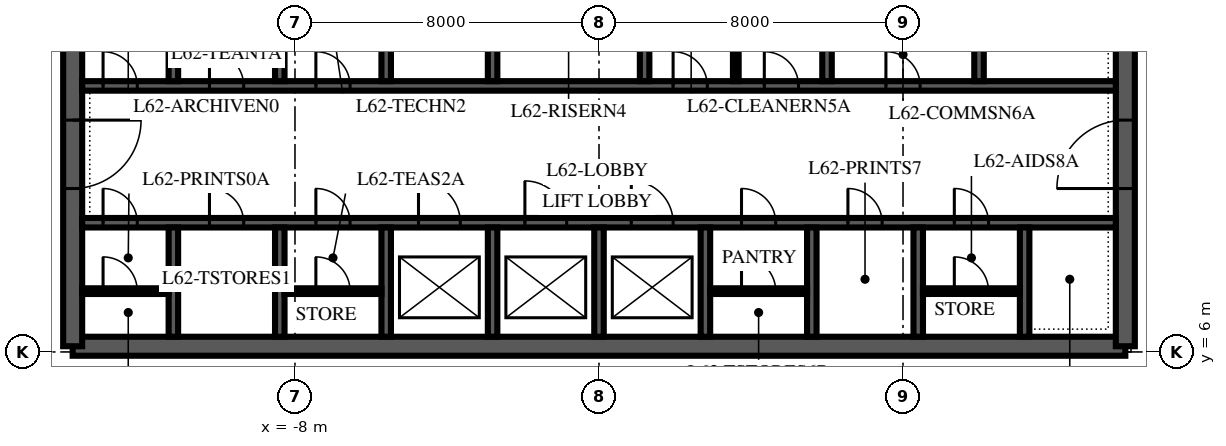
"""IFC4 building model, lengths in metres.
Left out: names, types, materials, properties, quantities, classifications, styles, units other than length and angle.
Written with IfcOpenShell. Run it as: python <this file> out.ifc"""

import sys

from ifc_helpers import new_model, si_unit, direction, frame, frame_2d, origin, place, context, subcontext, project, spatial, polyline, rectangle, outline, extrude, element, fill, save


model = new_model("IFC4")
c1 = context("Model", 3, precision=1e-05, world=origin(), true_north=direction((0.0, 1.0)))
c2 = subcontext(c1, "Body", "Model", "MODEL_VIEW")
j1 = project(units=[si_unit("LENGTHUNIT", "METRE"), si_unit("PLANEANGLEUNIT", "RADIAN")], contexts=[c1])
p1 = place(None, origin())
s1 = spatial("IfcSite", under=j1, at=p1, CompositionType="ELEMENT")
p2 = place(p1, origin())
s2 = spatial("IfcBuilding", under=s1, at=p2, CompositionType="ELEMENT")
p3 = place(p2, frame((0.0, 0.0, 268.0)))
s3 = spatial("IfcBuildingStorey", under=s2, at=p3, CompositionType="ELEMENT", Elevation=268.0)
p4 = place(p3, frame((-13.85, 6.15, 0.0), z_axis=(0.0, 0.0, 1.0), x_axis=(1.0, 0.0, 0.0)))
e1 = element("IfcWall", 1, at=p4, inside=s3, PredefinedType="SHEAR", context=c2, shape_type="SweptSolid", body=[
    extrude(rectangle(XDim=27.7, YDim=0.5, at=frame_2d((13.85, 0.0))), origin(), (0.0, 0.0, 1.0), 4.0),
])
p5 = place(p3, frame((13.85, 6.15, 0.0), z_axis=(0.0, 0.0, 1.0), x_axis=(0.0, 1.0, 0.0)))
e2 = element("IfcWall", 2, at=p5, inside=s3, PredefinedType="SHEAR", context=c2, shape_type="SweptSolid", body=[
    extrude(outline(polyline([(0.0, -0.25), (17.7, -0.25), (17.7, 0.0), (17.45, 0.0), (17.45, 0.25), (0.25, 0.25), (0.25, 0.0), (0.0, 0.0), (0.0, -0.25)])), origin(), (0.0, 0.0, 1.0), 4.0),
])
p6 = place(p5, frame((4.15, 0.0, 0.0)))
e3 = element("IfcOpeningElement", 3, at=p6, cuts=e2, PredefinedType="OPENING", context=c2, shape_type="SweptSolid", body=[
    extrude(rectangle(XDim=1.8, YDim=2.4, at=frame_2d((0.9, 1.2))), frame((0.0, 0.265, 0.0), z_axis=(0.0, -1.0, 0.0), x_axis=(1.0, 0.0, 0.0)), (0.0, 0.0, 1.0), 0.53),
])
p7 = place(p3, frame((-13.85, 23.85, 0.0), z_axis=(0.0, 0.0, 1.0), x_axis=(0.0, -1.0, 0.0)))
e4 = element("IfcWall", 4, at=p7, inside=s3, PredefinedType="SHEAR", context=c2, shape_type="SweptSolid", body=[
    extrude(outline(polyline([(0.0, -0.25), (17.7, -0.25), (17.7, 0.0), (17.45, 0.0), (17.45, 0.25), (0.25, 0.25), (0.25, 0.0), (0.0, 0.0), (0.0, -0.25)])), origin(), (0.0, 0.0, 1.0), 4.0),
])
p8 = place(p7, frame((11.75, 0.0, 0.0)))
e5 = element("IfcOpeningElement", 5, at=p8, cuts=e4, PredefinedType="OPENING", context=c2, shape_type="SweptSolid", body=[
    extrude(rectangle(XDim=1.8, YDim=2.4, at=frame_2d((0.9, 1.2))), frame((0.0, 0.265, 0.0), z_axis=(0.0, -1.0, 0.0), x_axis=(1.0, 0.0, 0.0)), (0.0, 0.0, 1.0), 0.53),
])
p9 = place(p3, frame((-13.6, 9.4, 0.0), z_axis=(0.0, 0.0, 1.0), x_axis=(1.0, 0.0, 0.0)))
e6 = element("IfcWall", 6, at=p9, inside=s3, PredefinedType="SHEAR", context=c2, shape_type="SweptSolid", body=[
    extrude(rectangle(XDim=27.2, YDim=0.25, at=frame_2d((13.6, 0.0))), origin(), (0.0, 0.0, 1.0), 4.0),
])
p10 = place(p9, frame((8.85, 0.0, 0.0)))
e7 = element("IfcOpeningElement", 7, at=p10, cuts=e6, PredefinedType="OPENING", context=c2, shape_type="SweptSolid", body=[
    extrude(rectangle(XDim=1.1, YDim=2.1, at=frame_2d((0.55, 1.05))), frame((0.0, 0.14, 0.0), z_axis=(0.0, -1.0, 0.0), x_axis=(1.0, 0.0, 0.0)), (0.0, 0.0, 1.0), 0.28),
])
p11 = place(p9, frame((11.65, 0.0, 0.0)))
e8 = element("IfcOpeningElement", 8, at=p11, cuts=e6, PredefinedType="OPENING", context=c2, shape_type="SweptSolid", body=[
    extrude(rectangle(XDim=1.1, YDim=2.1, at=frame_2d((0.55, 1.05))), frame((0.0, 0.14, 0.0), z_axis=(0.0, -1.0, 0.0), x_axis=(1.0, 0.0, 0.0)), (0.0, 0.0, 1.0), 0.28),
])
p12 = place(p9, frame((14.45, 0.0, 0.0)))
e9 = element("IfcOpeningElement", 9, at=p12, cuts=e6, PredefinedType="OPENING", context=c2, shape_type="SweptSolid", body=[
    extrude(rectangle(XDim=1.1, YDim=2.1, at=frame_2d((0.55, 1.05))), frame((0.0, 0.14, 0.0), z_axis=(0.0, -1.0, 0.0), x_axis=(1.0, 0.0, 0.0)), (0.0, 0.0, 1.0), 0.28),
])
p13 = place(p9, frame((0.55, 0.0, 0.0)))
e10 = element("IfcOpeningElement", 10, at=p13, cuts=e6, PredefinedType="OPENING", context=c2, shape_type="SweptSolid", body=[
    extrude(rectangle(XDim=0.9, YDim=2.1, at=frame_2d((0.45, 1.05))), frame((0.0, 0.14, 0.0), z_axis=(0.0, -1.0, 0.0), x_axis=(1.0, 0.0, 0.0)), (0.0, 0.0, 1.0), 0.28),
])
p14 = place(p9, frame((3.35, 0.0, 0.0)))
e11 = element("IfcOpeningElement", 11, at=p14, cuts=e6, PredefinedType="OPENING", context=c2, shape_type="SweptSolid", body=[
    extrude(rectangle(XDim=0.9, YDim=2.1, at=frame_2d((0.45, 1.05))), frame((0.0, 0.14, 0.0), z_axis=(0.0, -1.0, 0.0), x_axis=(1.0, 0.0, 0.0)), (0.0, 0.0, 1.0), 0.28),
])
p15 = place(p9, frame((6.15, 0.0, 0.0)))
e12 = element("IfcOpeningElement", 12, at=p15, cuts=e6, PredefinedType="OPENING", context=c2, shape_type="SweptSolid", body=[
    extrude(rectangle(XDim=0.9, YDim=2.1, at=frame_2d((0.45, 1.05))), frame((0.0, 0.14, 0.0), z_axis=(0.0, -1.0, 0.0), x_axis=(1.0, 0.0, 0.0)), (0.0, 0.0, 1.0), 0.28),
])
p16 = place(p9, frame((17.35, 0.0, 0.0)))
e13 = element("IfcOpeningElement", 13, at=p16, cuts=e6, PredefinedType="OPENING", context=c2, shape_type="SweptSolid", body=[
    extrude(rectangle(XDim=0.9, YDim=2.1, at=frame_2d((0.45, 1.05))), frame((0.0, 0.14, 0.0), z_axis=(0.0, -1.0, 0.0), x_axis=(1.0, 0.0, 0.0)), (0.0, 0.0, 1.0), 0.28),
])
p17 = place(p9, frame((20.15, 0.0, 0.0)))
e14 = element("IfcOpeningElement", 14, at=p17, cuts=e6, PredefinedType="OPENING", context=c2, shape_type="SweptSolid", body=[
    extrude(rectangle(XDim=0.9, YDim=2.1, at=frame_2d((0.45, 1.05))), frame((0.0, 0.14, 0.0), z_axis=(0.0, -1.0, 0.0), x_axis=(1.0, 0.0, 0.0)), (0.0, 0.0, 1.0), 0.28),
])
p18 = place(p9, frame((22.95, 0.0, 0.0)))
e15 = element("IfcOpeningElement", 15, at=p18, cuts=e6, PredefinedType="OPENING", context=c2, shape_type="SweptSolid", body=[
    extrude(rectangle(XDim=0.9, YDim=2.1, at=frame_2d((0.45, 1.05))), frame((0.0, 0.14, 0.0), z_axis=(0.0, -1.0, 0.0), x_axis=(1.0, 0.0, 0.0)), (0.0, 0.0, 1.0), 0.28),
])
p19 = place(p3, frame((-13.6, 13.0, 0.0), z_axis=(0.0, 0.0, 1.0), x_axis=(1.0, 0.0, 0.0)))
e16 = element("IfcWall", 16, at=p19, inside=s3, PredefinedType="SHEAR", context=c2, shape_type="SweptSolid", body=[
    extrude(rectangle(XDim=27.2, YDim=0.25, at=frame_2d((13.6, 0.0))), origin(), (0.0, 0.0, 1.0), 4.0),
])
p20 = place(p19, frame((15.55, 0.0, 0.0)))
e17 = element("IfcOpeningElement", 17, at=p20, cuts=e16, PredefinedType="OPENING", context=c2, shape_type="SweptSolid", body=[
    extrude(rectangle(XDim=0.9, YDim=2.1, at=frame_2d((0.45, 1.05))), frame((0.0, 0.14, 0.0), z_axis=(0.0, -1.0, 0.0), x_axis=(1.0, 0.0, 0.0)), (0.0, 0.0, 1.0), 0.28),
])
p21 = place(p19, frame((17.95, 0.0, 0.0)))
e18 = element("IfcOpeningElement", 18, at=p21, cuts=e16, PredefinedType="OPENING", context=c2, shape_type="SweptSolid", body=[
    extrude(rectangle(XDim=0.9, YDim=2.1, at=frame_2d((0.45, 1.05))), frame((0.0, 0.14, 0.0), z_axis=(0.0, -1.0, 0.0), x_axis=(1.0, 0.0, 0.0)), (0.0, 0.0, 1.0), 0.28),
])
p22 = place(p19, frame((21.15, 0.0, 0.0)))
e19 = element("IfcOpeningElement", 19, at=p22, cuts=e16, PredefinedType="OPENING", context=c2, shape_type="SweptSolid", body=[
    extrude(rectangle(XDim=0.9, YDim=2.1, at=frame_2d((0.45, 1.05))), frame((0.0, 0.14, 0.0), z_axis=(0.0, -1.0, 0.0), x_axis=(1.0, 0.0, 0.0)), (0.0, 0.0, 1.0), 0.28),
])
p23 = place(p19, frame((0.55, 0.0, 0.0)))
e20 = element("IfcOpeningElement", 20, at=p23, cuts=e16, PredefinedType="OPENING", context=c2, shape_type="SweptSolid", body=[
    extrude(rectangle(XDim=0.9, YDim=2.1, at=frame_2d((0.45, 1.05))), frame((0.0, 0.14, 0.0), z_axis=(0.0, -1.0, 0.0), x_axis=(1.0, 0.0, 0.0)), (0.0, 0.0, 1.0), 0.28),
])
p24 = place(p19, frame((3.35, 0.0, 0.0)))
e21 = element("IfcOpeningElement", 21, at=p24, cuts=e16, PredefinedType="OPENING", context=c2, shape_type="SweptSolid", body=[
    extrude(rectangle(XDim=0.9, YDim=2.1, at=frame_2d((0.45, 1.05))), frame((0.0, 0.14, 0.0), z_axis=(0.0, -1.0, 0.0), x_axis=(1.0, 0.0, 0.0)), (0.0, 0.0, 1.0), 0.28),
])
p25 = place(p19, frame((6.15, 0.0, 0.0)))
e22 = element("IfcOpeningElement", 22, at=p25, cuts=e16, PredefinedType="OPENING", context=c2, shape_type="SweptSolid", body=[
    extrude(rectangle(XDim=0.9, YDim=2.1, at=frame_2d((0.45, 1.05))), frame((0.0, 0.14, 0.0), z_axis=(0.0, -1.0, 0.0), x_axis=(1.0, 0.0, 0.0)), (0.0, 0.0, 1.0), 0.28),
])
for number, where, z_axis, x_axis in (
    (23, (-11.2, 6.4, 0.0), (0.0, 0.0, 1.0), (0.0, 1.0, 0.0)),
    (24, (-8.4, 6.4, 0.0), (0.0, 0.0, 1.0), (0.0, 1.0, 0.0)),
    (25, (-5.6, 6.4, 0.0), (0.0, 0.0, 1.0), (0.0, 1.0, 0.0)),
    (26, (-2.8, 6.4, 0.0), (0.0, 0.0, 1.0), (0.0, 1.0, 0.0)),
    (27, (0.0, 6.4, 0.0), (0.0, 0.0, 1.0), (0.0, 1.0, 0.0)),
    (28, (2.8, 6.4, 0.0), (0.0, 0.0, 1.0), (0.0, 1.0, 0.0)),
    (29, (5.6, 6.4, 0.0), (0.0, 0.0, 1.0), (0.0, 1.0, 0.0)),
    (30, (8.4, 6.4, 0.0), (0.0, 0.0, 1.0), (0.0, 1.0, 0.0)),
    (31, (11.2, 6.4, 0.0), (0.0, 0.0, 1.0), (0.0, 1.0, 0.0)),
):
    element("IfcWall", number, at=place(p3, frame(where, z_axis=z_axis, x_axis=x_axis)), inside=s3, PredefinedType="SHEAR", context=c2, shape_type="SweptSolid", body=[
        extrude(rectangle(XDim=2.875, YDim=0.25, at=frame_2d((1.438, 0.0))), origin(), (0.0, 0.0, 1.0), 4.0),
    ])
for number, where, z_axis, x_axis in (
    (32, (-11.2, 13.125, 0.0), (0.0, 0.0, 1.0), (0.0, 1.0, 0.0)),
    (33, (-8.4, 13.125, 0.0), (0.0, 0.0, 1.0), (0.0, 1.0, 0.0)),
    (34, (-5.6, 13.125, 0.0), (0.0, 0.0, 1.0), (0.0, 1.0, 0.0)),
    (35, (-2.8, 13.125, 0.0), (0.0, 0.0, 1.0), (0.0, 1.0, 0.0)),
    (36, (1.2, 13.125, 0.0), (0.0, 0.0, 1.0), (0.0, 1.0, 0.0)),
    (37, (6.0, 13.125, 0.0), (0.0, 0.0, 1.0), (0.0, 1.0, 0.0)),
    (38, (10.0, 13.125, 0.0), (0.0, 0.0, 1.0), (0.0, 1.0, 0.0)),
):
    element("IfcWall", number, at=place(p3, frame(where, z_axis=z_axis, x_axis=x_axis)), inside=s3, PredefinedType="SHEAR", context=c2, shape_type="SweptSolid", body=[
        extrude(rectangle(XDim=2.75, YDim=0.25, at=frame_2d((1.375, 0.0))), origin(), (0.0, 0.0, 1.0), 4.0),
    ])
p26 = place(p3, frame((3.6, 13.125, 0.0), z_axis=(0.0, 0.0, 1.0), x_axis=(0.0, 1.0, 0.0)))
e39 = element("IfcWall", 39, at=p26, inside=s3, PredefinedType="PARTITIONING", context=c2, shape_type="SweptSolid", body=[
    extrude(rectangle(XDim=2.75, YDim=0.15, at=frame_2d((1.375, 0.0))), origin(), (0.0, 0.0, 1.0), 3.85),
])
p27 = place(p3, frame((-13.6, 7.6, 0.0), z_axis=(0.0, 0.0, 1.0), x_axis=(1.0, 0.0, 0.0)))
e40 = element("IfcWall", 40, at=p27, inside=s3, PredefinedType="PARTITIONING", context=c2, shape_type="SweptSolid", body=[
    extrude(rectangle(XDim=2.275, YDim=0.15, at=frame_2d((1.138, 0.0))), origin(), (0.0, 0.0, 1.0), 3.85),
])
p28 = place(p27, frame((0.55, 0.0, 0.0)))
e41 = element("IfcOpeningElement", 41, at=p28, cuts=e40, PredefinedType="OPENING", context=c2, shape_type="SweptSolid", body=[
    extrude(rectangle(XDim=0.9, YDim=2.1, at=frame_2d((0.45, 1.05))), frame((0.0, 0.09, 0.0), z_axis=(0.0, -1.0, 0.0), x_axis=(1.0, 0.0, 0.0)), (0.0, 0.0, 1.0), 0.18),
])
p29 = place(p3, frame((-8.275, 7.6, 0.0), z_axis=(0.0, 0.0, 1.0), x_axis=(1.0, 0.0, 0.0)))
e42 = element("IfcWall", 42, at=p29, inside=s3, PredefinedType="PARTITIONING", context=c2, shape_type="SweptSolid", body=[
    extrude(rectangle(XDim=2.55, YDim=0.15, at=frame_2d((1.275, 0.0))), origin(), (0.0, 0.0, 1.0), 3.85),
])
p30 = place(p29, frame((0.825, 0.0, 0.0)))
e43 = element("IfcOpeningElement", 43, at=p30, cuts=e42, PredefinedType="OPENING", context=c2, shape_type="SweptSolid", body=[
    extrude(rectangle(XDim=0.9, YDim=2.1, at=frame_2d((0.45, 1.05))), frame((0.0, 0.09, 0.0), z_axis=(0.0, -1.0, 0.0), x_axis=(1.0, 0.0, 0.0)), (0.0, 0.0, 1.0), 0.18),
])
p31 = place(p3, frame((2.925, 7.6, 0.0), z_axis=(0.0, 0.0, 1.0), x_axis=(1.0, 0.0, 0.0)))
e44 = element("IfcWall", 44, at=p31, inside=s3, PredefinedType="PARTITIONING", context=c2, shape_type="SweptSolid", body=[
    extrude(rectangle(XDim=2.55, YDim=0.15, at=frame_2d((1.275, 0.0))), origin(), (0.0, 0.0, 1.0), 3.85),
])
p32 = place(p31, frame((0.825, 0.0, 0.0)))
e45 = element("IfcOpeningElement", 45, at=p32, cuts=e44, PredefinedType="OPENING", context=c2, shape_type="SweptSolid", body=[
    extrude(rectangle(XDim=0.9, YDim=2.1, at=frame_2d((0.45, 1.05))), frame((0.0, 0.09, 0.0), z_axis=(0.0, -1.0, 0.0), x_axis=(1.0, 0.0, 0.0)), (0.0, 0.0, 1.0), 0.18),
])
p33 = place(p3, frame((8.525, 7.6, 0.0), z_axis=(0.0, 0.0, 1.0), x_axis=(1.0, 0.0, 0.0)))
e46 = element("IfcWall", 46, at=p33, inside=s3, PredefinedType="PARTITIONING", context=c2, shape_type="SweptSolid", body=[
    extrude(rectangle(XDim=2.55, YDim=0.15, at=frame_2d((1.275, 0.0))), origin(), (0.0, 0.0, 1.0), 3.85),
])
p34 = place(p33, frame((0.825, 0.0, 0.0)))
e47 = element("IfcOpeningElement", 47, at=p34, cuts=e46, PredefinedType="OPENING", context=c2, shape_type="SweptSolid", body=[
    extrude(rectangle(XDim=0.9, YDim=2.1, at=frame_2d((0.45, 1.05))), frame((0.0, 0.09, 0.0), z_axis=(0.0, -1.0, 0.0), x_axis=(1.0, 0.0, 0.0)), (0.0, 0.0, 1.0), 0.18),
])
p35 = place(p6, origin())
e48 = element("IfcDoor", 48, at=p35, inside=s3, OperationType="DOUBLE_DOOR_SINGLE_SWING", PredefinedType="DOOR", context=c2, shape_type="SweptSolid", body=[
    extrude(rectangle(XDim=1.8, YDim=2.4, at=frame_2d((0.9, 1.2))), frame((0.0, 0.25, 0.0), z_axis=(0.0, -1.0, 0.0), x_axis=(1.0, 0.0, 0.0)), (0.0, 0.0, 1.0), 0.5),
])
fill(e3, e48)
p36 = place(p8, origin())
e49 = element("IfcDoor", 49, at=p36, inside=s3, OperationType="DOUBLE_DOOR_SINGLE_SWING", PredefinedType="DOOR", context=c2, shape_type="SweptSolid", body=[
    extrude(rectangle(XDim=1.8, YDim=2.4, at=frame_2d((0.9, 1.2))), frame((0.0, 0.25, 0.0), z_axis=(0.0, -1.0, 0.0), x_axis=(1.0, 0.0, 0.0)), (0.0, 0.0, 1.0), 0.5),
])
fill(e5, e49)
p37 = place(p10, origin())
e50 = element("IfcDoor", 50, at=p37, inside=s3, OperationType="SLIDING_TO_LEFT", PredefinedType="DOOR", context=c2, shape_type="SweptSolid", body=[
    extrude(rectangle(XDim=1.1, YDim=2.1, at=frame_2d((0.55, 1.05))), frame((0.0, 0.125, 0.0), z_axis=(0.0, -1.0, 0.0), x_axis=(1.0, 0.0, 0.0)), (0.0, 0.0, 1.0), 0.25),
])
fill(e7, e50)
p38 = place(p11, origin())
e51 = element("IfcDoor", 51, at=p38, inside=s3, OperationType="SLIDING_TO_LEFT", PredefinedType="DOOR", context=c2, shape_type="SweptSolid", body=[
    extrude(rectangle(XDim=1.1, YDim=2.1, at=frame_2d((0.55, 1.05))), frame((0.0, 0.125, 0.0), z_axis=(0.0, -1.0, 0.0), x_axis=(1.0, 0.0, 0.0)), (0.0, 0.0, 1.0), 0.25),
])
fill(e8, e51)
p39 = place(p12, origin())
e52 = element("IfcDoor", 52, at=p39, inside=s3, OperationType="SLIDING_TO_LEFT", PredefinedType="DOOR", context=c2, shape_type="SweptSolid", body=[
    extrude(rectangle(XDim=1.1, YDim=2.1, at=frame_2d((0.55, 1.05))), frame((0.0, 0.125, 0.0), z_axis=(0.0, -1.0, 0.0), x_axis=(1.0, 0.0, 0.0)), (0.0, 0.0, 1.0), 0.25),
])
fill(e9, e52)
p40 = place(p20, origin())
e53 = element("IfcDoor", 53, at=p40, inside=s3, OperationType="SINGLE_SWING_LEFT", PredefinedType="DOOR", context=c2, shape_type="SweptSolid", body=[
    extrude(rectangle(XDim=0.9, YDim=2.1, at=frame_2d((0.45, 1.05))), frame((0.0, 0.125, 0.0), z_axis=(0.0, -1.0, 0.0), x_axis=(1.0, 0.0, 0.0)), (0.0, 0.0, 1.0), 0.25),
])
fill(e17, e53)
p41 = place(p21, origin())
e54 = element("IfcDoor", 54, at=p41, inside=s3, OperationType="SINGLE_SWING_LEFT", PredefinedType="DOOR", context=c2, shape_type="SweptSolid", body=[
    extrude(rectangle(XDim=0.9, YDim=2.1, at=frame_2d((0.45, 1.05))), frame((0.0, 0.125, 0.0), z_axis=(0.0, -1.0, 0.0), x_axis=(1.0, 0.0, 0.0)), (0.0, 0.0, 1.0), 0.25),
])
fill(e18, e54)
p42 = place(p22, origin())
e55 = element("IfcDoor", 55, at=p42, inside=s3, OperationType="SINGLE_SWING_LEFT", PredefinedType="DOOR", context=c2, shape_type="SweptSolid", body=[
    extrude(rectangle(XDim=0.9, YDim=2.1, at=frame_2d((0.45, 1.05))), frame((0.0, 0.125, 0.0), z_axis=(0.0, -1.0, 0.0), x_axis=(1.0, 0.0, 0.0)), (0.0, 0.0, 1.0), 0.25),
])
fill(e19, e55)
p43 = place(p23, origin())
e56 = element("IfcDoor", 56, at=p43, inside=s3, OperationType="SINGLE_SWING_LEFT", PredefinedType="DOOR", context=c2, shape_type="SweptSolid", body=[
    extrude(rectangle(XDim=0.9, YDim=2.1, at=frame_2d((0.45, 1.05))), frame((0.0, 0.125, 0.0), z_axis=(0.0, -1.0, 0.0), x_axis=(1.0, 0.0, 0.0)), (0.0, 0.0, 1.0), 0.25),
])
fill(e20, e56)
p44 = place(p24, origin())
e57 = element("IfcDoor", 57, at=p44, inside=s3, OperationType="SINGLE_SWING_LEFT", PredefinedType="DOOR", context=c2, shape_type="SweptSolid", body=[
    extrude(rectangle(XDim=0.9, YDim=2.1, at=frame_2d((0.45, 1.05))), frame((0.0, 0.125, 0.0), z_axis=(0.0, -1.0, 0.0), x_axis=(1.0, 0.0, 0.0)), (0.0, 0.0, 1.0), 0.25),
])
fill(e21, e57)
p45 = place(p25, origin())
e58 = element("IfcDoor", 58, at=p45, inside=s3, OperationType="SINGLE_SWING_LEFT", PredefinedType="DOOR", context=c2, shape_type="SweptSolid", body=[
    extrude(rectangle(XDim=0.9, YDim=2.1, at=frame_2d((0.45, 1.05))), frame((0.0, 0.125, 0.0), z_axis=(0.0, -1.0, 0.0), x_axis=(1.0, 0.0, 0.0)), (0.0, 0.0, 1.0), 0.25),
])
fill(e22, e58)
p46 = place(p13, origin())
e59 = element("IfcDoor", 59, at=p46, inside=s3, OperationType="SINGLE_SWING_LEFT", PredefinedType="DOOR", context=c2, shape_type="SweptSolid", body=[
    extrude(rectangle(XDim=0.9, YDim=2.1, at=frame_2d((0.45, 1.05))), frame((0.0, 0.125, 0.0), z_axis=(0.0, -1.0, 0.0), x_axis=(1.0, 0.0, 0.0)), (0.0, 0.0, 1.0), 0.25),
])
fill(e10, e59)
p47 = place(p28, origin())
e60 = element("IfcDoor", 60, at=p47, inside=s3, OperationType="SINGLE_SWING_LEFT", PredefinedType="DOOR", context=c2, shape_type="SweptSolid", body=[
    extrude(rectangle(XDim=0.9, YDim=2.1, at=frame_2d((0.45, 1.05))), frame((0.0, 0.075, 0.0), z_axis=(0.0, -1.0, 0.0), x_axis=(1.0, 0.0, 0.0)), (0.0, 0.0, 1.0), 0.149),
])
fill(e41, e60)
p48 = place(p14, origin())
e61 = element("IfcDoor", 61, at=p48, inside=s3, OperationType="SINGLE_SWING_LEFT", PredefinedType="DOOR", context=c2, shape_type="SweptSolid", body=[
    extrude(rectangle(XDim=0.9, YDim=2.1, at=frame_2d((0.45, 1.05))), frame((0.0, 0.125, 0.0), z_axis=(0.0, -1.0, 0.0), x_axis=(1.0, 0.0, 0.0)), (0.0, 0.0, 1.0), 0.25),
])
fill(e11, e61)
p49 = place(p15, origin())
e62 = element("IfcDoor", 62, at=p49, inside=s3, OperationType="SINGLE_SWING_LEFT", PredefinedType="DOOR", context=c2, shape_type="SweptSolid", body=[
    extrude(rectangle(XDim=0.9, YDim=2.1, at=frame_2d((0.45, 1.05))), frame((0.0, 0.125, 0.0), z_axis=(0.0, -1.0, 0.0), x_axis=(1.0, 0.0, 0.0)), (0.0, 0.0, 1.0), 0.25),
])
fill(e12, e62)
p50 = place(p30, origin())
e63 = element("IfcDoor", 63, at=p50, inside=s3, OperationType="SINGLE_SWING_LEFT", PredefinedType="DOOR", context=c2, shape_type="SweptSolid", body=[
    extrude(rectangle(XDim=0.9, YDim=2.1, at=frame_2d((0.45, 1.05))), frame((0.0, 0.075, 0.0), z_axis=(0.0, -1.0, 0.0), x_axis=(1.0, 0.0, 0.0)), (0.0, 0.0, 1.0), 0.149),
])
fill(e43, e63)
p51 = place(p16, origin())
e64 = element("IfcDoor", 64, at=p51, inside=s3, OperationType="SINGLE_SWING_LEFT", PredefinedType="DOOR", context=c2, shape_type="SweptSolid", body=[
    extrude(rectangle(XDim=0.9, YDim=2.1, at=frame_2d((0.45, 1.05))), frame((0.0, 0.125, 0.0), z_axis=(0.0, -1.0, 0.0), x_axis=(1.0, 0.0, 0.0)), (0.0, 0.0, 1.0), 0.25),
])
fill(e13, e64)
p52 = place(p32, origin())
e65 = element("IfcDoor", 65, at=p52, inside=s3, OperationType="SINGLE_SWING_LEFT", PredefinedType="DOOR", context=c2, shape_type="SweptSolid", body=[
    extrude(rectangle(XDim=0.9, YDim=2.1, at=frame_2d((0.45, 1.05))), frame((0.0, 0.075, 0.0), z_axis=(0.0, -1.0, 0.0), x_axis=(1.0, 0.0, 0.0)), (0.0, 0.0, 1.0), 0.149),
])
fill(e45, e65)
p53 = place(p17, origin())
e66 = element("IfcDoor", 66, at=p53, inside=s3, OperationType="SINGLE_SWING_LEFT", PredefinedType="DOOR", context=c2, shape_type="SweptSolid", body=[
    extrude(rectangle(XDim=0.9, YDim=2.1, at=frame_2d((0.45, 1.05))), frame((0.0, 0.125, 0.0), z_axis=(0.0, -1.0, 0.0), x_axis=(1.0, 0.0, 0.0)), (0.0, 0.0, 1.0), 0.25),
])
fill(e14, e66)
p54 = place(p18, origin())
e67 = element("IfcDoor", 67, at=p54, inside=s3, OperationType="SINGLE_SWING_LEFT", PredefinedType="DOOR", context=c2, shape_type="SweptSolid", body=[
    extrude(rectangle(XDim=0.9, YDim=2.1, at=frame_2d((0.45, 1.05))), frame((0.0, 0.125, 0.0), z_axis=(0.0, -1.0, 0.0), x_axis=(1.0, 0.0, 0.0)), (0.0, 0.0, 1.0), 0.25),
])
fill(e15, e67)
p55 = place(p34, origin())
e68 = element("IfcDoor", 68, at=p55, inside=s3, OperationType="SINGLE_SWING_LEFT", PredefinedType="DOOR", context=c2, shape_type="SweptSolid", body=[
    extrude(rectangle(XDim=0.9, YDim=2.1, at=frame_2d((0.45, 1.05))), frame((0.0, 0.075, 0.0), z_axis=(0.0, -1.0, 0.0), x_axis=(1.0, 0.0, 0.0)), (0.0, 0.0, 1.0), 0.149),
])
fill(e47, e68)
save(model, sys.argv[1])
